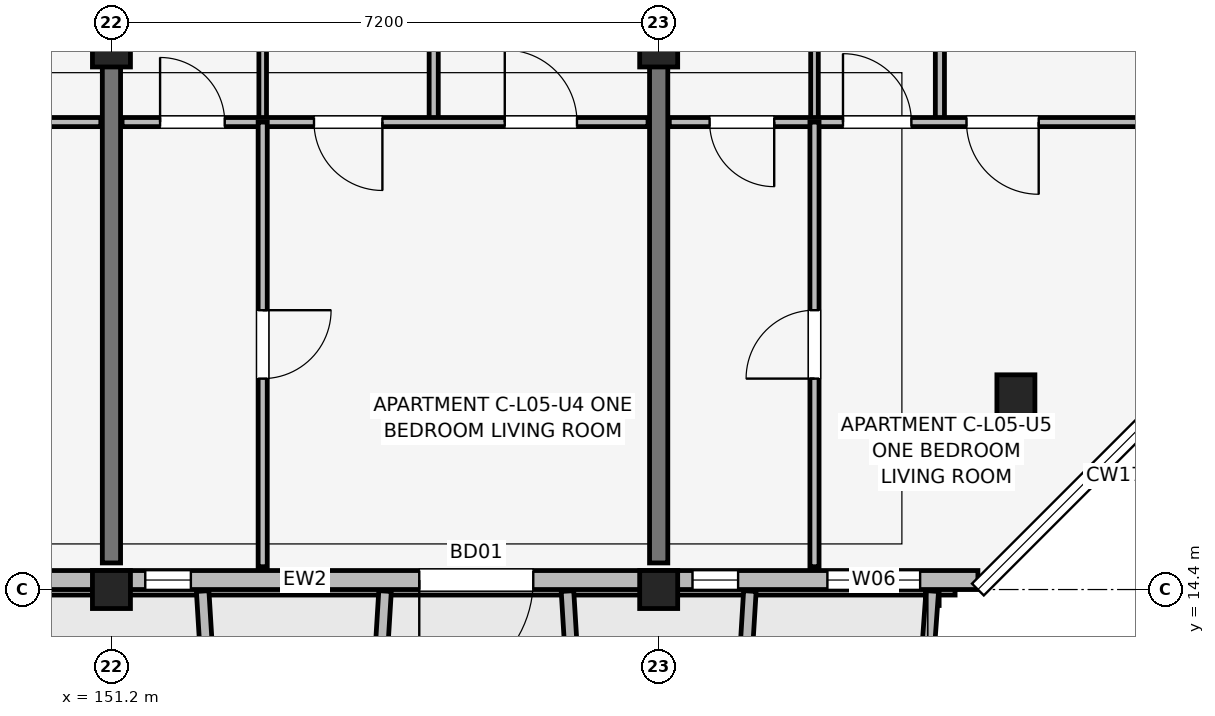
"""IFC4 building model, lengths in metres.
Left out: names, types, materials, properties, quantities, classifications, styles, units other than length and angle.
Written with IfcOpenShell. Run it as: python <this file> out.ifc"""

import sys

from ifc_helpers import new_model, si_unit, direction, frame, frame_2d, origin, origin_2d, place, context, subcontext, project, spatial, rectangle, extrude, element, fill, save


model = new_model("IFC4")
c1 = context("Model", 3, precision=1e-05, world=origin(), true_north=direction((0.0, 1.0)))
c2 = subcontext(c1, "Body", "Model", "MODEL_VIEW")
j1 = project(units=[si_unit("LENGTHUNIT", "METRE"), si_unit("PLANEANGLEUNIT", "RADIAN")], contexts=[c1])
p1 = place(None, origin())
s1 = spatial("IfcSite", under=j1, at=p1, CompositionType="ELEMENT")
p2 = place(p1, origin())
s2 = spatial("IfcBuilding", under=s1, at=p2, CompositionType="ELEMENT")
p3 = place(p2, frame((0.0, 0.0, 18.15)))
s3 = spatial("IfcBuildingStorey", under=s2, at=p3, CompositionType="ELEMENT", Elevation=18.15)
p4 = place(p3, frame((151.2, 14.4, 0.0), z_axis=(0.0, 0.0, 1.0), x_axis=(1.0, 0.0, 0.0)))
e1 = element("IfcColumn", 1, at=p4, inside=s3, PredefinedType="COLUMN", context=c2, shape_type="SweptSolid", body=[
    extrude(rectangle(XDim=0.5, YDim=0.5, at=origin_2d()), origin(), (0.0, 0.0, 1.0), 3.15),
])
p5 = place(p3, frame((151.2, 21.6, 0.0), z_axis=(0.0, 0.0, 1.0), x_axis=(1.0, 0.0, 0.0)))
e2 = element("IfcColumn", 2, at=p5, inside=s3, PredefinedType="COLUMN", context=c2, shape_type="SweptSolid", body=[
    extrude(rectangle(XDim=0.5, YDim=0.65, at=origin_2d()), origin(), (0.0, 0.0, 1.0), 3.15),
])
p6 = place(p3, frame((158.4, 14.4, 0.0), z_axis=(0.0, 0.0, 1.0), x_axis=(1.0, 0.0, 0.0)))
e3 = element("IfcColumn", 3, at=p6, inside=s3, PredefinedType="COLUMN", context=c2, shape_type="SweptSolid", body=[
    extrude(rectangle(XDim=0.5, YDim=0.5, at=origin_2d()), origin(), (0.0, 0.0, 1.0), 3.15),
])
for number, where, z_axis, x_axis in (
    (4, (158.4, 21.6, 0.0), (0.0, 0.0, 1.0), (1.0, 0.0, 0.0)),
    (5, (163.1, 16.9, 0.0), (0.0, 0.0, 1.0), (1.0, 0.0, 0.0)),
):
    element("IfcColumn", number, at=place(p3, frame(where, z_axis=z_axis, x_axis=x_axis)), inside=s3, PredefinedType="COLUMN", context=c2, shape_type="SweptSolid", body=[
        extrude(rectangle(XDim=0.5, YDim=0.65, at=origin_2d()), origin(), (0.0, 0.0, 1.0), 3.15),
    ])
for number, where, z_axis, x_axis in (
    (6, (151.2, 14.75, 0.0), (0.0, 0.0, 1.0), (0.0, 1.0, 0.0)),
    (7, (158.4, 14.75, 0.0), (0.0, 0.0, 1.0), (0.0, 1.0, 0.0)),
):
    element("IfcWall", number, at=place(p3, frame(where, z_axis=z_axis, x_axis=x_axis)), inside=s3, PredefinedType="SHEAR", context=c2, shape_type="SweptSolid", body=[
        extrude(rectangle(XDim=9.4, YDim=0.24, at=frame_2d((4.7, 0.0))), origin(), (0.0, 0.0, 1.0), 3.15),
    ])
p7 = place(p3, frame((132.6, 14.525, 0.0), z_axis=(0.0, 0.0, 1.0), x_axis=(1.0, 0.0, 0.0)))
e8 = element("IfcWall", 8, at=p7, inside=s3, PredefinedType="SOLIDWALL", context=c2, shape_type="SweptSolid", body=[
    extrude(rectangle(XDim=30.0, YDim=0.25, at=frame_2d((15.0, 0.0))), origin(), (0.0, 0.0, 1.0), 2.43),
])
p8 = place(p7, frame((9.825, 0.0, 0.0), z_axis=(0.0, 0.0, 1.0), x_axis=(-1.0, 0.0, 0.0)))
e9 = element("IfcOpeningElement", 9, at=p8, cuts=e8, PredefinedType="OPENING", context=c2, shape_type="SweptSolid", body=[
    extrude(rectangle(XDim=1.65, YDim=2.15, at=frame_2d((0.825, 1.075))), frame((0.0, 0.135, 0.0), z_axis=(0.0, -1.0, 0.0), x_axis=(1.0, 0.0, 0.0)), (0.0, 0.0, 1.0), 0.27),
])
p9 = place(p7, frame((24.15, 0.0, 0.0), z_axis=(0.0, 0.0, 1.0), x_axis=(-1.0, 0.0, 0.0)))
e10 = element("IfcOpeningElement", 10, at=p9, cuts=e8, PredefinedType="OPENING", context=c2, shape_type="SweptSolid", body=[
    extrude(rectangle(XDim=1.5, YDim=2.15, at=frame_2d((0.75, 1.075))), frame((0.0, 0.135, 0.0), z_axis=(0.0, -1.0, 0.0), x_axis=(1.0, 0.0, 0.0)), (0.0, 0.0, 1.0), 0.27),
])
p10 = place(p7, frame((0.77, 0.0, 0.7)))
e11 = element("IfcOpeningElement", 11, at=p10, cuts=e8, PredefinedType="OPENING", context=c2, shape_type="SweptSolid", body=[
    extrude(rectangle(XDim=1.46, YDim=1.55, at=frame_2d((0.73, 0.775))), frame((0.0, 0.135, 0.0), z_axis=(0.0, -1.0, 0.0), x_axis=(1.0, 0.0, 0.0)), (0.0, 0.0, 1.0), 0.27),
])
p11 = place(p7, frame((3.155, 0.0, 0.75)))
e12 = element("IfcOpeningElement", 12, at=p11, cuts=e8, PredefinedType="OPENING", context=c2, shape_type="SweptSolid", body=[
    extrude(rectangle(XDim=0.6, YDim=1.25, at=frame_2d((0.3, 0.625))), frame((0.0, 0.135, 0.0), z_axis=(0.0, -1.0, 0.0), x_axis=(1.0, 0.0, 0.0)), (0.0, 0.0, 1.0), 0.27),
])
p12 = place(p7, frame((4.645, 0.0, 0.75)))
e13 = element("IfcOpeningElement", 13, at=p12, cuts=e8, PredefinedType="OPENING", context=c2, shape_type="SweptSolid", body=[
    extrude(rectangle(XDim=0.6, YDim=1.25, at=frame_2d((0.3, 0.625))), frame((0.0, 0.135, 0.0), z_axis=(0.0, -1.0, 0.0), x_axis=(1.0, 0.0, 0.0)), (0.0, 0.0, 1.0), 0.27),
])
p13 = place(p7, frame((12.8, 0.0, 0.67)))
e14 = element("IfcOpeningElement", 14, at=p13, cuts=e8, PredefinedType="OPENING", context=c2, shape_type="SweptSolid", body=[
    extrude(rectangle(XDim=2.0, YDim=1.65, at=frame_2d((1.0, 0.825))), frame((0.0, 0.135, 0.0), z_axis=(0.0, -1.0, 0.0), x_axis=(1.0, 0.0, 0.0)), (0.0, 0.0, 1.0), 0.27),
])
p14 = place(p7, frame((15.885, 0.0, 0.75)))
e15 = element("IfcOpeningElement", 15, at=p14, cuts=e8, PredefinedType="OPENING", context=c2, shape_type="SweptSolid", body=[
    extrude(rectangle(XDim=0.98, YDim=1.45, at=frame_2d((0.49, 0.725))), frame((0.0, 0.135, 0.0), z_axis=(0.0, -1.0, 0.0), x_axis=(1.0, 0.0, 0.0)), (0.0, 0.0, 1.0), 0.27),
])
p15 = place(p7, frame((19.045, 0.0, 0.75)))
e16 = element("IfcOpeningElement", 16, at=p15, cuts=e8, PredefinedType="OPENING", context=c2, shape_type="SweptSolid", body=[
    extrude(rectangle(XDim=0.6, YDim=1.25, at=frame_2d((0.3, 0.625))), frame((0.0, 0.135, 0.0), z_axis=(0.0, -1.0, 0.0), x_axis=(1.0, 0.0, 0.0)), (0.0, 0.0, 1.0), 0.27),
])
p16 = place(p7, frame((26.245, 0.0, 0.75)))
e17 = element("IfcOpeningElement", 17, at=p16, cuts=e8, PredefinedType="OPENING", context=c2, shape_type="SweptSolid", body=[
    extrude(rectangle(XDim=0.6, YDim=1.25, at=frame_2d((0.3, 0.625))), frame((0.0, 0.135, 0.0), z_axis=(0.0, -1.0, 0.0), x_axis=(1.0, 0.0, 0.0)), (0.0, 0.0, 1.0), 0.27),
])
p17 = place(p7, frame((28.02, 0.0, 0.75)))
e18 = element("IfcOpeningElement", 18, at=p17, cuts=e8, PredefinedType="OPENING", context=c2, shape_type="SweptSolid", body=[
    extrude(rectangle(XDim=1.22, YDim=1.5, at=frame_2d((0.61, 0.75))), frame((0.0, 0.135, 0.0), z_axis=(0.0, -1.0, 0.0), x_axis=(1.0, 0.0, 0.0)), (0.0, 0.0, 1.0), 0.27),
])
for number, where, z_axis, x_axis in (
    (19, (152.4, 14.38, 0.0), (0.0, 0.0, 1.0), (0.061, -0.998, 0.0)),
    (20, (154.8, 14.38, 0.0), (0.0, 0.0, 1.0), (-0.061, -0.998, 0.0)),
    (21, (157.2, 14.38, 0.0), (0.0, 0.0, 1.0), (0.061, -0.998, 0.0)),
):
    element("IfcWall", number, at=place(p3, frame(where, z_axis=z_axis, x_axis=x_axis)), inside=s3, PredefinedType="ELEMENTEDWALL", context=c2, shape_type="SweptSolid", body=[
        extrude(rectangle(XDim=1.964, YDim=0.165, at=frame_2d((0.982, 0.0))), origin(), (0.0, 0.0, 1.0), 2.53),
    ])
p18 = place(p3, frame((159.6, 14.38, 0.0), z_axis=(0.0, 0.0, 1.0), x_axis=(-0.061170732449, -0.998127317276, 0.0)))
e22 = element("IfcWall", 22, at=p18, inside=s3, PredefinedType="ELEMENTEDWALL", context=c2, shape_type="SweptSolid", body=[
    extrude(rectangle(XDim=1.964, YDim=0.165, at=frame_2d((0.982, 0.0))), origin(), (0.0, 0.0, 1.0), 2.95),
])
p19 = place(p3, frame((162.0, 14.38, 0.0), z_axis=(0.0, 0.0, 1.0), x_axis=(-0.071194071069, -0.997462482625, 0.0)))
e23 = element("IfcWall", 23, at=p19, inside=s3, PredefinedType="ELEMENTEDWALL", context=c2, shape_type="SweptSolid", body=[
    extrude(rectangle(XDim=1.965, YDim=0.165, at=frame_2d((0.982, 0.0))), origin(), (0.0, 0.0, 1.0), 2.95),
])
p20 = place(p3, frame((144.14, 20.55, 0.0), z_axis=(0.0, 0.0, 1.0), x_axis=(1.0, 0.0, 0.0)))
e24 = element("IfcWall", 24, at=p20, inside=s3, PredefinedType="PARTITIONING", context=c2, shape_type="SweptSolid", body=[
    extrude(rectangle(XDim=6.92, YDim=0.12, at=frame_2d((3.46, 0.0))), origin(), (0.0, 0.0, 1.0), 2.38),
])
p21 = place(p20, frame((1.35, 0.0, 0.0), z_axis=(0.0, 0.0, 1.0), x_axis=(-1.0, 0.0, 0.0)))
e25 = element("IfcOpeningElement", 25, at=p21, cuts=e24, PredefinedType="OPENING", context=c2, shape_type="SweptSolid", body=[
    extrude(rectangle(XDim=0.85, YDim=2.08, at=frame_2d((0.425, 1.04))), frame((0.0, 0.07, 0.0), z_axis=(0.0, -1.0, 0.0), x_axis=(1.0, 0.0, 0.0)), (0.0, 0.0, 1.0), 0.14),
])
p22 = place(p20, frame((2.375, 0.0, 0.0)))
e26 = element("IfcOpeningElement", 26, at=p22, cuts=e24, PredefinedType="OPENING", context=c2, shape_type="SweptSolid", body=[
    extrude(rectangle(XDim=0.9, YDim=2.08, at=frame_2d((0.45, 1.04))), frame((0.0, 0.07, 0.0), z_axis=(0.0, -1.0, 0.0), x_axis=(1.0, 0.0, 0.0)), (0.0, 0.0, 1.0), 0.14),
])
p23 = place(p20, frame((5.835, 0.0, 0.0), z_axis=(0.0, 0.0, 1.0), x_axis=(-1.0, 0.0, 0.0)))
e27 = element("IfcOpeningElement", 27, at=p23, cuts=e24, PredefinedType="OPENING", context=c2, shape_type="SweptSolid", body=[
    extrude(rectangle(XDim=0.95, YDim=2.08, at=frame_2d((0.475, 1.04))), frame((0.0, 0.07, 0.0), z_axis=(0.0, -1.0, 0.0), x_axis=(1.0, 0.0, 0.0)), (0.0, 0.0, 1.0), 0.14),
])
p24 = place(p3, frame((153.19, 20.55, 0.0), z_axis=(0.0, 0.0, 1.0), x_axis=(0.0, 1.0, 0.0)))
e28 = element("IfcWall", 28, at=p24, inside=s3, PredefinedType="PARTITIONING", context=c2, shape_type="SweptSolid", body=[
    extrude(rectangle(XDim=3.75, YDim=0.1, at=frame_2d((1.875, 0.0))), origin(), (0.0, 0.0, 1.0), 2.375),
])
p25 = place(p3, frame((155.44, 20.55, 0.0), z_axis=(0.0, 0.0, 1.0), x_axis=(0.0, 1.0, 0.0)))
e29 = element("IfcWall", 29, at=p25, inside=s3, PredefinedType="PARTITIONING", context=c2, shape_type="SweptSolid", body=[
    extrude(rectangle(XDim=3.75, YDim=0.12, at=frame_2d((1.875, 0.0))), origin(), (0.0, 0.0, 1.0), 2.375),
])
p26 = place(p3, frame((151.34, 20.55, 0.0), z_axis=(0.0, 0.0, 1.0), x_axis=(1.0, 0.0, 0.0)))
e30 = element("IfcWall", 30, at=p26, inside=s3, PredefinedType="PARTITIONING", context=c2, shape_type="SweptSolid", body=[
    extrude(rectangle(XDim=6.92, YDim=0.12, at=frame_2d((3.46, 0.0))), origin(), (0.0, 0.0, 1.0), 2.38),
])
p27 = place(p26, frame((0.5, 0.0, 0.0)))
e31 = element("IfcOpeningElement", 31, at=p27, cuts=e30, PredefinedType="OPENING", context=c2, shape_type="SweptSolid", body=[
    extrude(rectangle(XDim=0.85, YDim=2.08, at=frame_2d((0.425, 1.04))), frame((0.0, 0.07, 0.0), z_axis=(0.0, -1.0, 0.0), x_axis=(1.0, 0.0, 0.0)), (0.0, 0.0, 1.0), 0.14),
])
p28 = place(p26, frame((3.425, 0.0, 0.0), z_axis=(0.0, 0.0, 1.0), x_axis=(-1.0, 0.0, 0.0)))
e32 = element("IfcOpeningElement", 32, at=p28, cuts=e30, PredefinedType="OPENING", context=c2, shape_type="SweptSolid", body=[
    extrude(rectangle(XDim=0.9, YDim=2.08, at=frame_2d((0.45, 1.04))), frame((0.0, 0.07, 0.0), z_axis=(0.0, -1.0, 0.0), x_axis=(1.0, 0.0, 0.0)), (0.0, 0.0, 1.0), 0.14),
])
p29 = place(p26, frame((5.035, 0.0, 0.0)))
e33 = element("IfcOpeningElement", 33, at=p29, cuts=e30, PredefinedType="OPENING", context=c2, shape_type="SweptSolid", body=[
    extrude(rectangle(XDim=0.95, YDim=2.08, at=frame_2d((0.475, 1.04))), frame((0.0, 0.07, 0.0), z_axis=(0.0, -1.0, 0.0), x_axis=(1.0, 0.0, 0.0)), (0.0, 0.0, 1.0), 0.14),
])
p30 = place(p3, frame((153.19, 14.7, 0.0), z_axis=(0.0, 0.0, 1.0), x_axis=(0.0, 1.0, 0.0)))
e34 = element("IfcWall", 34, at=p30, inside=s3, PredefinedType="PARTITIONING", context=c2, shape_type="SweptSolid", body=[
    extrude(rectangle(XDim=5.85, YDim=0.12, at=frame_2d((2.925, 0.0))), origin(), (0.0, 0.0, 1.0), 2.38),
])
p31 = place(p30, frame((3.375, 0.0, 0.0), z_axis=(0.0, 0.0, 1.0), x_axis=(-1.0, 0.0, 0.0)))
e35 = element("IfcOpeningElement", 35, at=p31, cuts=e34, PredefinedType="OPENING", context=c2, shape_type="SweptSolid", body=[
    extrude(rectangle(XDim=0.9, YDim=2.08, at=frame_2d((0.45, 1.04))), frame((0.0, 0.07, 0.0), z_axis=(0.0, -1.0, 0.0), x_axis=(1.0, 0.0, 0.0)), (0.0, 0.0, 1.0), 0.14),
])
p32 = place(p3, frame((160.45, 20.55, 0.0), z_axis=(0.0, 0.0, 1.0), x_axis=(0.0, 1.0, 0.0)))
e36 = element("IfcWall", 36, at=p32, inside=s3, PredefinedType="PARTITIONING", context=c2, shape_type="SweptSolid", body=[
    extrude(rectangle(XDim=3.75, YDim=0.1, at=frame_2d((1.875, 0.0))), origin(), (0.0, 0.0, 1.0), 2.375),
])
p33 = place(p3, frame((162.1, 20.55, 0.0), z_axis=(0.0, 0.0, 1.0), x_axis=(0.0, 1.0, 0.0)))
e37 = element("IfcWall", 37, at=p33, inside=s3, PredefinedType="PARTITIONING", context=c2, shape_type="SweptSolid", body=[
    extrude(rectangle(XDim=3.75, YDim=0.12, at=frame_2d((1.875, 0.0))), origin(), (0.0, 0.0, 1.0), 2.375),
])
p34 = place(p3, frame((158.54, 20.55, 0.0), z_axis=(0.0, 0.0, 1.0), x_axis=(1.0, 0.0, 0.0)))
e38 = element("IfcWall", 38, at=p34, inside=s3, PredefinedType="PARTITIONING", context=c2, shape_type="SweptSolid", body=[
    extrude(rectangle(XDim=6.92, YDim=0.12, at=frame_2d((3.46, 0.0))), origin(), (0.0, 0.0, 1.0), 2.38),
])
p35 = place(p34, frame((1.38, 0.0, 0.0), z_axis=(0.0, 0.0, 1.0), x_axis=(-1.0, 0.0, 0.0)))
e39 = element("IfcOpeningElement", 39, at=p35, cuts=e38, PredefinedType="OPENING", context=c2, shape_type="SweptSolid", body=[
    extrude(rectangle(XDim=0.85, YDim=2.08, at=frame_2d((0.425, 1.04))), frame((0.0, 0.07, 0.0), z_axis=(0.0, -1.0, 0.0), x_axis=(1.0, 0.0, 0.0)), (0.0, 0.0, 1.0), 0.14),
])
p36 = place(p34, frame((2.285, 0.0, 0.0)))
e40 = element("IfcOpeningElement", 40, at=p36, cuts=e38, PredefinedType="OPENING", context=c2, shape_type="SweptSolid", body=[
    extrude(rectangle(XDim=0.9, YDim=2.08, at=frame_2d((0.45, 1.04))), frame((0.0, 0.07, 0.0), z_axis=(0.0, -1.0, 0.0), x_axis=(1.0, 0.0, 0.0)), (0.0, 0.0, 1.0), 0.14),
])
p37 = place(p34, frame((4.86, 0.0, 0.0), z_axis=(0.0, 0.0, 1.0), x_axis=(-1.0, 0.0, 0.0)))
e41 = element("IfcOpeningElement", 41, at=p37, cuts=e38, PredefinedType="OPENING", context=c2, shape_type="SweptSolid", body=[
    extrude(rectangle(XDim=0.95, YDim=2.08, at=frame_2d((0.475, 1.04))), frame((0.0, 0.07, 0.0), z_axis=(0.0, -1.0, 0.0), x_axis=(1.0, 0.0, 0.0)), (0.0, 0.0, 1.0), 0.14),
])
p38 = place(p3, frame((160.45, 14.7, 0.0), z_axis=(0.0, 0.0, 1.0), x_axis=(0.0, 1.0, 0.0)))
e42 = element("IfcWall", 42, at=p38, inside=s3, PredefinedType="PARTITIONING", context=c2, shape_type="SweptSolid", body=[
    extrude(rectangle(XDim=5.85, YDim=0.12, at=frame_2d((2.925, 0.0))), origin(), (0.0, 0.0, 1.0), 2.38),
])
p39 = place(p38, frame((2.475, 0.0, 0.0)))
e43 = element("IfcOpeningElement", 43, at=p39, cuts=e42, PredefinedType="OPENING", context=c2, shape_type="SweptSolid", body=[
    extrude(rectangle(XDim=0.9, YDim=2.08, at=frame_2d((0.45, 1.04))), frame((0.0, 0.07, 0.0), z_axis=(0.0, -1.0, 0.0), x_axis=(1.0, 0.0, 0.0)), (0.0, 0.0, 1.0), 0.14),
])
p40 = place(p9, origin())
e44 = element("IfcDoor", 44, at=p40, inside=s3, OperationType="SINGLE_SWING_LEFT", PredefinedType="DOOR", context=c2, shape_type="SweptSolid", body=[
    extrude(rectangle(XDim=1.5, YDim=2.15, at=frame_2d((0.75, 1.075))), frame((0.0, 0.025, 0.0), z_axis=(0.0, -1.0, 0.0), x_axis=(1.0, 0.0, 0.0)), (0.0, 0.0, 1.0), 0.05),
])
fill(e10, e44)
p41 = place(p15, origin())
e45 = element("IfcWindow", 45, at=p41, inside=s3, PartitioningType="SINGLE_PANEL", PredefinedType="WINDOW", context=c2, shape_type="SweptSolid", body=[
    extrude(rectangle(XDim=0.6, YDim=1.25, at=frame_2d((0.3, 0.625))), frame((0.0, 0.03, 0.0), z_axis=(0.0, -1.0, 0.0), x_axis=(1.0, 0.0, 0.0)), (0.0, 0.0, 1.0), 0.06),
])
fill(e16, e45)
p42 = place(p16, origin())
e46 = element("IfcWindow", 46, at=p42, inside=s3, PartitioningType="SINGLE_PANEL", PredefinedType="WINDOW", context=c2, shape_type="SweptSolid", body=[
    extrude(rectangle(XDim=0.6, YDim=1.25, at=frame_2d((0.3, 0.625))), frame((0.0, 0.03, 0.0), z_axis=(0.0, -1.0, 0.0), x_axis=(1.0, 0.0, 0.0)), (0.0, 0.0, 1.0), 0.06),
])
fill(e17, e46)
p43 = place(p17, origin())
e47 = element("IfcWindow", 47, at=p43, inside=s3, PartitioningType="SINGLE_PANEL", PredefinedType="WINDOW", context=c2, shape_type="SweptSolid", body=[
    extrude(rectangle(XDim=1.22, YDim=1.5, at=frame_2d((0.61, 0.75))), frame((0.0, 0.03, 0.0), z_axis=(0.0, -1.0, 0.0), x_axis=(1.0, 0.0, 0.0)), (0.0, 0.0, 1.0), 0.06),
])
fill(e18, e47)
p44 = place(p27, origin())
e48 = element("IfcDoor", 48, at=p44, inside=s3, OperationType="SINGLE_SWING_LEFT", PredefinedType="DOOR", context=c2, shape_type="SweptSolid", body=[
    extrude(rectangle(XDim=0.85, YDim=2.08, at=frame_2d((0.425, 1.04))), frame((0.0, 0.025, 0.0), z_axis=(0.0, -1.0, 0.0), x_axis=(1.0, 0.0, 0.0)), (0.0, 0.0, 1.0), 0.05),
])
fill(e31, e48)
p45 = place(p28, origin())
e49 = element("IfcDoor", 49, at=p45, inside=s3, OperationType="SINGLE_SWING_RIGHT", PredefinedType="DOOR", context=c2, shape_type="SweptSolid", body=[
    extrude(rectangle(XDim=0.9, YDim=2.08, at=frame_2d((0.45, 1.04))), frame((0.0, 0.025, 0.0), z_axis=(0.0, -1.0, 0.0), x_axis=(1.0, 0.0, 0.0)), (0.0, 0.0, 1.0), 0.05),
])
fill(e32, e49)
p46 = place(p29, origin())
e50 = element("IfcDoor", 50, at=p46, inside=s3, OperationType="SINGLE_SWING_LEFT", PredefinedType="DOOR", context=c2, shape_type="SweptSolid", body=[
    extrude(rectangle(XDim=0.95, YDim=2.08, at=frame_2d((0.475, 1.04))), frame((0.0, 0.025, 0.0), z_axis=(0.0, -1.0, 0.0), x_axis=(1.0, 0.0, 0.0)), (0.0, 0.0, 1.0), 0.05),
])
fill(e33, e50)
p47 = place(p31, origin())
e51 = element("IfcDoor", 51, at=p47, inside=s3, OperationType="SINGLE_SWING_RIGHT", PredefinedType="DOOR", context=c2, shape_type="SweptSolid", body=[
    extrude(rectangle(XDim=0.9, YDim=2.08, at=frame_2d((0.45, 1.04))), frame((0.0, 0.025, 0.0), z_axis=(0.0, -1.0, 0.0), x_axis=(1.0, 0.0, 0.0)), (0.0, 0.0, 1.0), 0.05),
])
fill(e35, e51)
p48 = place(p35, origin())
e52 = element("IfcDoor", 52, at=p48, inside=s3, OperationType="SINGLE_SWING_RIGHT", PredefinedType="DOOR", context=c2, shape_type="SweptSolid", body=[
    extrude(rectangle(XDim=0.85, YDim=2.08, at=frame_2d((0.425, 1.04))), frame((0.0, 0.025, 0.0), z_axis=(0.0, -1.0, 0.0), x_axis=(1.0, 0.0, 0.0)), (0.0, 0.0, 1.0), 0.05),
])
fill(e39, e52)
p49 = place(p36, origin())
e53 = element("IfcDoor", 53, at=p49, inside=s3, OperationType="SINGLE_SWING_LEFT", PredefinedType="DOOR", context=c2, shape_type="SweptSolid", body=[
    extrude(rectangle(XDim=0.9, YDim=2.08, at=frame_2d((0.45, 1.04))), frame((0.0, 0.025, 0.0), z_axis=(0.0, -1.0, 0.0), x_axis=(1.0, 0.0, 0.0)), (0.0, 0.0, 1.0), 0.05),
])
fill(e40, e53)
p50 = place(p37, origin())
e54 = element("IfcDoor", 54, at=p50, inside=s3, OperationType="SINGLE_SWING_RIGHT", PredefinedType="DOOR", context=c2, shape_type="SweptSolid", body=[
    extrude(rectangle(XDim=0.95, YDim=2.08, at=frame_2d((0.475, 1.04))), frame((0.0, 0.025, 0.0), z_axis=(0.0, -1.0, 0.0), x_axis=(1.0, 0.0, 0.0)), (0.0, 0.0, 1.0), 0.05),
])
fill(e41, e54)
p51 = place(p39, origin())
e55 = element("IfcDoor", 55, at=p51, inside=s3, OperationType="SINGLE_SWING_LEFT", PredefinedType="DOOR", context=c2, shape_type="SweptSolid", body=[
    extrude(rectangle(XDim=0.9, YDim=2.08, at=frame_2d((0.45, 1.04))), frame((0.0, 0.025, 0.0), z_axis=(0.0, -1.0, 0.0), x_axis=(1.0, 0.0, 0.0)), (0.0, 0.0, 1.0), 0.05),
])
fill(e43, e55)
save(model, sys.argv[1])
